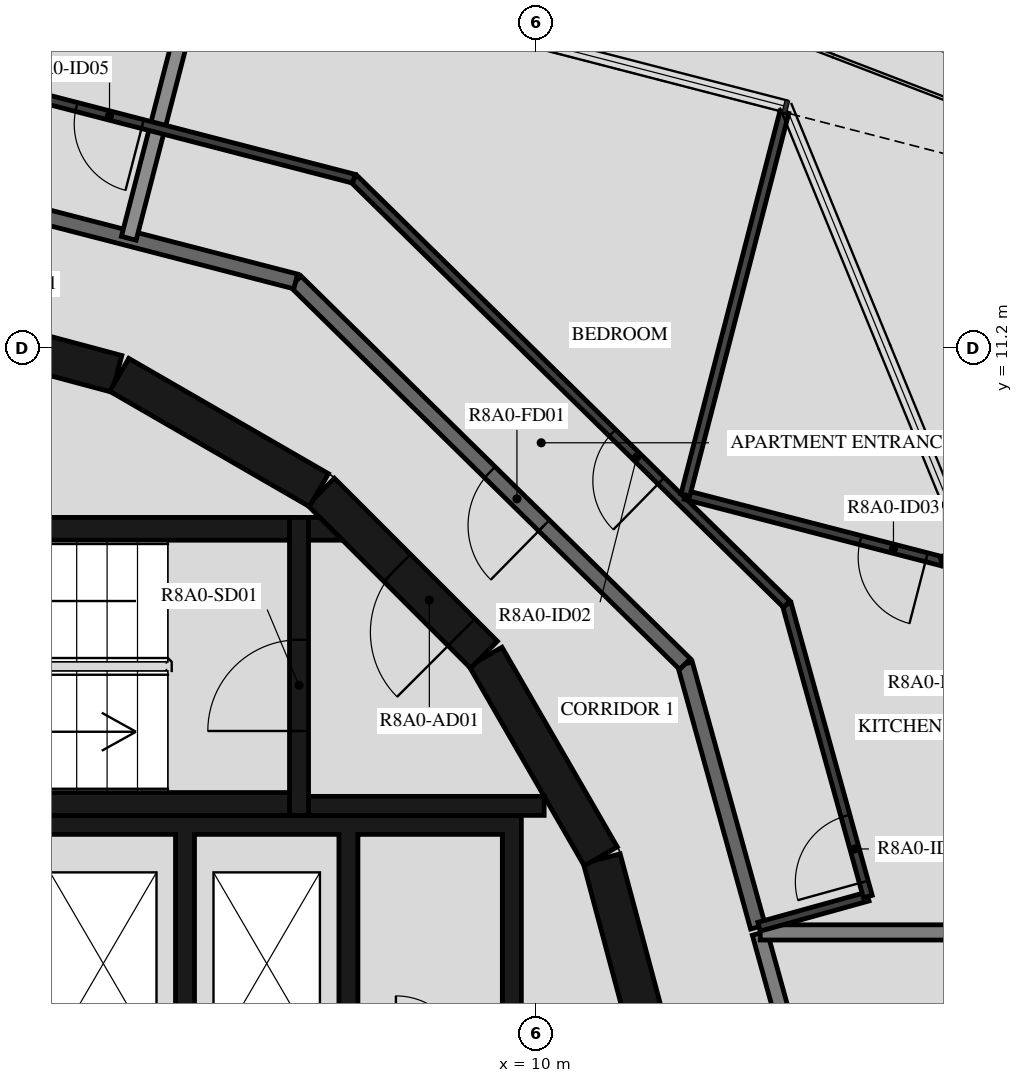
"""IFC4 building model, lengths in metres.
Left out: names, types, materials, properties, quantities, classifications, styles, units other than length and angle.
Written with IfcOpenShell. Run it as: python <this file> out.ifc"""

import sys

from ifc_helpers import new_model, si_unit, direction, frame, frame_2d, origin, place, context, subcontext, project, spatial, polyline, rectangle, outline, extrude, element, fill, save


model = new_model("IFC4")
c1 = context("Model", 3, precision=1e-05, world=origin(), true_north=direction((0.0, 1.0)))
c2 = subcontext(c1, "Body", "Model", "MODEL_VIEW")
j1 = project(units=[si_unit("LENGTHUNIT", "METRE"), si_unit("PLANEANGLEUNIT", "RADIAN")], contexts=[c1])
p1 = place(None, origin())
s1 = spatial("IfcSite", under=j1, at=p1, CompositionType="ELEMENT")
p2 = place(p1, origin())
s2 = spatial("IfcBuilding", under=s1, at=p2, CompositionType="ELEMENT")
p3 = place(p2, frame((0.0, 0.0, 298.2)))
s3 = spatial("IfcBuildingStorey", under=s2, at=p3, CompositionType="ELEMENT", Elevation=298.2)
for number, where, z_axis, x_axis in (
    (1, (11.643, 1.55, 0.0), (0.0, 0.0, 1.0), (-0.259, 0.966, 0.0)),
    (2, (10.845, 4.51, 0.0), (0.0, 0.0, 1.0), (-0.5, 0.866, 0.0)),
):
    element("IfcWall", number, at=place(p3, frame(where, z_axis=z_axis, x_axis=x_axis)), inside=s3, PredefinedType="SHEAR", context=c2, shape_type="SweptSolid", body=[
        extrude(rectangle(XDim=3.033, YDim=0.5, at=frame_2d((1.516, 0.0))), origin(), (0.0, 0.0, 1.0), 3.12),
    ])
p4 = place(p3, frame((9.308, 7.164, 0.0), z_axis=(0.0, 0.0, 1.0), x_axis=(-0.707106781187, 0.707106781187, 0.0)))
e3 = element("IfcWall", 3, at=p4, inside=s3, PredefinedType="SHEAR", context=c2, shape_type="SweptSolid", body=[
    extrude(rectangle(XDim=3.032, YDim=0.5, at=frame_2d((1.516, 0.0))), origin(), (0.0, 0.0, 1.0), 3.12),
])
p5 = place(p4, frame((0.416, 0.0, 0.0)))
e4 = element("IfcOpeningElement", 4, at=p5, cuts=e3, PredefinedType="OPENING", context=c2, shape_type="SweptSolid", body=[
    extrude(rectangle(XDim=1.2, YDim=2.1, at=frame_2d((0.6, 1.05))), frame((0.0, 0.26, 0.0), z_axis=(0.0, -1.0, 0.0), x_axis=(1.0, 0.0, 0.0)), (0.0, 0.0, 1.0), 0.52),
])
p6 = place(p3, frame((7.137, 9.329, 0.0), z_axis=(0.0, 0.0, 1.0), x_axis=(-0.865975092491, 0.500087131594, 0.0)))
e5 = element("IfcWall", 5, at=p6, inside=s3, PredefinedType="SHEAR", context=c2, shape_type="SweptSolid", body=[
    extrude(rectangle(XDim=3.033, YDim=0.5, at=frame_2d((1.516, 0.0))), origin(), (0.0, 0.0, 1.0), 3.12),
])
p7 = place(p3, frame((4.479, 10.858, 0.0), z_axis=(0.0, 0.0, 1.0), x_axis=(-0.965948410781, 0.258734743916, 0.0)))
e6 = element("IfcWall", 6, at=p7, inside=s3, PredefinedType="SHEAR", context=c2, shape_type="SweptSolid", body=[
    extrude(rectangle(XDim=3.033, YDim=0.5, at=frame_2d((1.516, 0.0))), origin(), (0.0, 0.0, 1.0), 3.12),
])
p8 = place(p7, frame((1.066, 0.0, 0.0)))
e7 = element("IfcOpeningElement", 7, at=p8, cuts=e6, PredefinedType="OPENING", context=c2, shape_type="SweptSolid", body=[
    extrude(rectangle(XDim=0.9, YDim=2.1, at=frame_2d((0.45, 1.05))), frame((0.0, 0.26, 0.0), z_axis=(0.0, -1.0, 0.0), x_axis=(1.0, 0.0, 0.0)), (0.0, 0.0, 1.0), 0.52),
])
for number, where, z_axis, x_axis in (
    (8, (0.0, 5.2, 0.0), (0.0, 0.0, 1.0), (1.0, 0.0, 0.0)),
    (9, (0.0, 8.82, 0.0), (0.0, 0.0, 1.0), (1.0, 0.0, 0.0)),
):
    element("IfcWall", number, at=place(p3, frame(where, z_axis=z_axis, x_axis=x_axis)), inside=s3, PredefinedType="SHEAR", context=c2, shape_type="SweptSolid", body=[
        extrude(rectangle(XDim=6.75, YDim=0.3, at=frame_2d((3.375, 0.0))), origin(), (0.0, 0.0, 1.0), 3.12),
    ])
p9 = place(p3, frame((6.875, 5.05, 0.0), z_axis=(0.0, 0.0, 1.0), x_axis=(0.0, 1.0, 0.0)))
e10 = element("IfcWall", 10, at=p9, inside=s3, PredefinedType="SHEAR", context=c2, shape_type="SweptSolid", body=[
    extrude(rectangle(XDim=3.92, YDim=0.25, at=frame_2d((1.96, 0.0))), origin(), (0.0, 0.0, 1.0), 3.12),
])
p10 = place(p9, frame((1.11, 0.0, 0.0)))
e11 = element("IfcOpeningElement", 11, at=p10, cuts=e10, PredefinedType="OPENING", context=c2, shape_type="SweptSolid", body=[
    extrude(rectangle(XDim=1.2, YDim=2.1, at=frame_2d((0.6, 1.05))), frame((0.0, 0.135, 0.0), z_axis=(0.0, -1.0, 0.0), x_axis=(1.0, 0.0, 0.0)), (0.0, 0.0, 1.0), 0.27),
])
p11 = place(p3, frame((7.0, 5.175, 0.0), z_axis=(0.0, 0.0, 1.0), x_axis=(1.0, 0.0, 0.0)))
e12 = element("IfcWall", 12, at=p11, inside=s3, PredefinedType="SHEAR", context=c2, shape_type="SweptSolid", body=[
    extrude(rectangle(XDim=3.1, YDim=0.25, at=frame_2d((1.55, 0.0))), origin(), (0.0, 0.0, 1.0), 3.12),
])
p12 = place(p3, origin())
e13 = element("IfcWall", 13, at=p12, inside=s3, PredefinedType="SHEAR", context=c2, shape_type="SweptSolid", body=[
    extrude(outline(polyline([(7.448, 8.67), (7.0, 8.67), (7.0, 8.97), (7.148, 8.97), (7.448, 8.67)])), origin(), (0.0, 0.0, 1.0), 3.12),
])
p13 = place(p3, origin())
e14 = element("IfcWall", 14, at=p13, inside=s3, PredefinedType="SHEAR", context=c2, shape_type="SweptSolid", body=[
    extrude(outline(polyline([(-9.8, 1.9), (-9.55, 1.9), (-9.55, 4.8), (-1.2, 4.8), (-1.2, 1.9), (-0.95, 1.9), (-0.95, 4.8), (3.1, 4.8), (3.1, 1.9), (3.35, 1.9), (3.35, 4.8), (5.25, 4.8), (5.25, 1.9), (5.5, 1.9), (5.5, 4.8), (7.4, 4.8), (7.4, 1.9), (7.65, 1.9), (7.65, 4.8), (9.55, 4.8), (9.55, 1.9), (9.8, 1.9), (9.8, 4.8), (9.8, 5.05), (-9.8, 5.05), (-9.8, 4.8), (-9.8, 1.9)])), origin(), (0.0, 0.0, 1.0), 3.12),
])
p14 = place(p3, frame((13.872, 0.121, 0.0), z_axis=(0.0, 0.0, 1.0), x_axis=(-0.267291928416, 0.963615600228, 0.0)))
e15 = element("IfcWall", 15, at=p14, inside=s3, PredefinedType="STANDARD", context=c2, shape_type="SweptSolid", body=[
    extrude(rectangle(XDim=3.507, YDim=0.2, at=frame_2d((1.753, 0.0))), origin(), (0.0, 0.0, 1.0), 3.12),
])
p15 = place(p3, frame((12.913, 3.581, 0.0), z_axis=(0.0, 0.0, 1.0), x_axis=(-0.267223005422, 0.963634715737, 0.0)))
e16 = element("IfcWall", 16, at=p15, inside=s3, PredefinedType="STANDARD", context=c2, shape_type="SweptSolid", body=[
    extrude(rectangle(XDim=3.591, YDim=0.2, at=frame_2d((1.795, 0.0))), origin(), (0.0, 0.0, 1.0), 3.12),
])
p16 = place(p3, frame((11.953, 7.041, 0.0), z_axis=(0.0, 0.0, 1.0), x_axis=(-0.713250549143, 0.70090916255, 0.0)))
e17 = element("IfcWall", 17, at=p16, inside=s3, PredefinedType="STANDARD", context=c2, shape_type="SweptSolid", body=[
    extrude(rectangle(XDim=7.181, YDim=0.2, at=frame_2d((3.59, 0.0))), origin(), (0.0, 0.0, 1.0), 3.12),
])
p17 = place(p16, frame((2.6, 0.0, 0.0)))
e18 = element("IfcOpeningElement", 18, at=p17, cuts=e17, PredefinedType="OPENING", context=c2, shape_type="SweptSolid", body=[
    extrude(rectangle(XDim=1.0, YDim=2.1, at=frame_2d((0.5, 1.05))), frame((0.0, 0.11, 0.0), z_axis=(0.0, -1.0, 0.0), x_axis=(1.0, 0.0, 0.0)), (0.0, 0.0, 1.0), 0.22),
])
p18 = place(p3, frame((6.831, 12.074, 0.0), z_axis=(0.0, 0.0, 1.0), x_axis=(-0.968144780225, 0.250391063186, 0.0)))
e19 = element("IfcWall", 19, at=p18, inside=s3, PredefinedType="STANDARD", context=c2, shape_type="SweptSolid", body=[
    extrude(rectangle(XDim=7.181, YDim=0.2, at=frame_2d((3.591, 0.0))), origin(), (0.0, 0.0, 1.0), 3.12),
])
p19 = place(p3, frame((16.203, 3.51, 0.0), z_axis=(0.0, 0.0, 1.0), x_axis=(-1.0, 0.0, 0.0)))
e20 = element("IfcWall", 20, at=p19, inside=s3, PredefinedType="STANDARD", context=c2, shape_type="SweptSolid", body=[
    extrude(rectangle(XDim=3.26, YDim=0.2, at=frame_2d((1.63, 0.0))), origin(), (0.0, 0.0, 1.0), 3.12),
])
p20 = place(p3, frame((5.578, 16.287, 0.0), z_axis=(0.0, 0.0, 1.0), x_axis=(-0.250385965992, -0.968146098497, 0.0)))
e21 = element("IfcWall", 21, at=p20, inside=s3, PredefinedType="STANDARD", context=c2, shape_type="SweptSolid", body=[
    extrude(rectangle(XDim=3.765, YDim=0.2, at=frame_2d((1.882, 0.0))), origin(), (0.0, 0.0, 1.0), 2.73),
])
p21 = place(p3, frame((12.927, 3.585, 0.0), z_axis=(0.0, 0.0, 1.0), x_axis=(0.963616756608, 0.26728775951, 0.0)))
e22 = element("IfcWall", 22, at=p21, inside=s3, PredefinedType="PARTITIONING", context=c2, shape_type="SweptSolid", body=[
    extrude(rectangle(XDim=1.485, YDim=0.12, at=frame_2d((0.743, 0.0))), origin(), (0.0, 0.0, 1.0), 3.12),
])
p22 = place(p3, frame((14.358, 3.982, 0.0), z_axis=(0.0, 0.0, 1.0), x_axis=(-0.267233823916, 0.963631715623, 0.0)))
e23 = element("IfcWall", 23, at=p22, inside=s3, PredefinedType="PARTITIONING", context=c2, shape_type="SweptSolid", body=[
    extrude(rectangle(XDim=3.992, YDim=0.12, at=frame_2d((1.996, 0.0))), origin(), (0.0, 0.0, 1.0), 3.12),
])
p23 = place(p22, frame((0.2, 0.0, 0.0)))
e24 = element("IfcOpeningElement", 24, at=p23, cuts=e23, PredefinedType="OPENING", context=c2, shape_type="SweptSolid", body=[
    extrude(rectangle(XDim=0.9, YDim=2.1, at=frame_2d((0.45, 1.05))), frame((0.0, 0.07, 0.0), z_axis=(0.0, -1.0, 0.0), x_axis=(1.0, 0.0, 0.0)), (0.0, 0.0, 1.0), 0.14),
])
p24 = place(p3, frame((13.291, 7.829, 0.0), z_axis=(0.0, 0.0, 1.0), x_axis=(-0.713255978622, 0.700903637428, 0.0)))
e25 = element("IfcWall", 25, at=p24, inside=s3, PredefinedType="PARTITIONING", context=c2, shape_type="SweptSolid", body=[
    extrude(rectangle(XDim=7.985, YDim=0.12, at=frame_2d((3.992, 0.0))), origin(), (0.0, 0.0, 1.0), 3.12),
])
p25 = place(p24, frame((2.314, 0.0, 0.0)))
e26 = element("IfcOpeningElement", 26, at=p25, cuts=e25, PredefinedType="OPENING", context=c2, shape_type="SweptSolid", body=[
    extrude(rectangle(XDim=0.9, YDim=2.1, at=frame_2d((0.45, 1.05))), frame((0.0, 0.07, 0.0), z_axis=(0.0, -1.0, 0.0), x_axis=(1.0, 0.0, 0.0)), (0.0, 0.0, 1.0), 0.14),
])
p26 = place(p3, frame((7.596, 13.426, 0.0), z_axis=(0.0, 0.0, 1.0), x_axis=(-0.968146656033, 0.250383810203, 0.0)))
e27 = element("IfcWall", 27, at=p26, inside=s3, PredefinedType="PARTITIONING", context=c2, shape_type="SweptSolid", body=[
    extrude(rectangle(XDim=7.985, YDim=0.12, at=frame_2d((3.992, 0.0))), origin(), (0.0, 0.0, 1.0), 3.12),
])
p27 = place(p26, frame((2.87, 0.0, 0.0)))
e28 = element("IfcOpeningElement", 28, at=p27, cuts=e27, PredefinedType="OPENING", context=c2, shape_type="SweptSolid", body=[
    extrude(rectangle(XDim=0.9, YDim=2.1, at=frame_2d((0.45, 1.05))), frame((0.0, 0.07, 0.0), z_axis=(0.0, -1.0, 0.0), x_axis=(1.0, 0.0, 0.0)), (0.0, 0.0, 1.0), 0.14),
])
p28 = place(p3, frame((18.071, 7.685, 0.0), z_axis=(0.0, 0.0, 1.0), x_axis=(-0.968152245082, 0.250362198309, 0.0)))
e29 = element("IfcWall", 29, at=p28, inside=s3, PredefinedType="PARTITIONING", context=c2, shape_type="SweptSolid", body=[
    extrude(rectangle(XDim=6.313, YDim=0.12, at=frame_2d((3.157, 0.0))), origin(), (0.0, 0.0, 1.0), 3.12),
])
p29 = place(p28, frame((3.036, 0.0, 0.0)))
e30 = element("IfcOpeningElement", 30, at=p29, cuts=e29, PredefinedType="OPENING", context=c2, shape_type="SweptSolid", body=[
    extrude(rectangle(XDim=0.9, YDim=2.1, at=frame_2d((0.45, 1.05))), frame((0.0, 0.07, 0.0), z_axis=(0.0, -1.0, 0.0), x_axis=(1.0, 0.0, 0.0)), (0.0, 0.0, 1.0), 0.14),
])
p30 = place(p3, frame((23.225, 10.593, 0.0), z_axis=(0.0, 0.0, 1.0), x_axis=(-0.963409492722, -0.268033858559, 0.0)))
e31 = element("IfcWall", 31, at=p30, inside=s3, PredefinedType="PARTITIONING", context=c2, shape_type="SweptSolid", body=[
    extrude(rectangle(XDim=8.2, YDim=0.12, at=frame_2d((4.1, 0.0))), origin(), (0.0, 0.0, 1.0), 3.12),
])
p31 = place(p30, frame((0.5, 0.0, 0.0)))
e32 = element("IfcOpeningElement", 32, at=p31, cuts=e31, PredefinedType="OPENING", context=c2, shape_type="SweptSolid", body=[
    extrude(rectangle(XDim=0.9, YDim=2.1, at=frame_2d((0.45, 1.05))), frame((0.0, 0.07, 0.0), z_axis=(0.0, -1.0, 0.0), x_axis=(1.0, 0.0, 0.0)), (0.0, 0.0, 1.0), 0.14),
])
p32 = place(p3, frame((13.26, 14.3, 0.0), z_axis=(0.0, 0.0, 1.0), x_axis=(-0.25038206324, -0.968147107834, 0.0)))
e33 = element("IfcWall", 33, at=p32, inside=s3, PredefinedType="PARTITIONING", context=c2, shape_type="SweptSolid", body=[
    extrude(rectangle(XDim=5.2, YDim=0.12, at=frame_2d((2.6, 0.0))), origin(), (0.0, 0.0, 1.0), 2.73),
])
p33 = place(p10, origin())
e34 = element("IfcDoor", 34, at=p33, inside=s3, OperationType="SINGLE_SWING_LEFT", PredefinedType="DOOR", context=c2, shape_type="SweptSolid", body=[
    extrude(rectangle(XDim=1.2, YDim=2.1, at=frame_2d((0.6, 1.05))), frame((0.0, 0.025, 0.0), z_axis=(0.0, -1.0, 0.0), x_axis=(1.0, 0.0, 0.0)), (0.0, 0.0, 1.0), 0.05),
])
fill(e11, e34)
p34 = place(p5, origin())
e35 = element("IfcDoor", 35, at=p34, inside=s3, OperationType="SINGLE_SWING_RIGHT", PredefinedType="DOOR", context=c2, shape_type="SweptSolid", body=[
    extrude(rectangle(XDim=1.2, YDim=2.1, at=frame_2d((0.6, 1.05))), frame((0.0, 0.025, 0.0), z_axis=(0.0, -1.0, 0.0), x_axis=(1.0, 0.0, 0.0)), (0.0, 0.0, 1.0), 0.05),
])
fill(e4, e35)
p35 = place(p17, origin())
e36 = element("IfcDoor", 36, at=p35, inside=s3, OperationType="SINGLE_SWING_LEFT", PredefinedType="DOOR", context=c2, shape_type="SweptSolid", body=[
    extrude(rectangle(XDim=1.0, YDim=2.1, at=frame_2d((0.5, 1.05))), frame((0.0, 0.025, 0.0), z_axis=(0.0, -1.0, 0.0), x_axis=(1.0, 0.0, 0.0)), (0.0, 0.0, 1.0), 0.05),
])
fill(e18, e36)
p36 = place(p23, origin())
e37 = element("IfcDoor", 37, at=p36, inside=s3, OperationType="SINGLE_SWING_LEFT", PredefinedType="DOOR", context=c2, shape_type="SweptSolid", body=[
    extrude(rectangle(XDim=0.9, YDim=2.1, at=frame_2d((0.45, 1.05))), frame((0.0, 0.025, 0.0), z_axis=(0.0, -1.0, 0.0), x_axis=(1.0, 0.0, 0.0)), (0.0, 0.0, 1.0), 0.05),
])
fill(e24, e37)
p37 = place(p25, origin())
e38 = element("IfcDoor", 38, at=p37, inside=s3, OperationType="SINGLE_SWING_LEFT", PredefinedType="DOOR", context=c2, shape_type="SweptSolid", body=[
    extrude(rectangle(XDim=0.9, YDim=2.1, at=frame_2d((0.45, 1.05))), frame((0.0, 0.025, 0.0), z_axis=(0.0, -1.0, 0.0), x_axis=(1.0, 0.0, 0.0)), (0.0, 0.0, 1.0), 0.05),
])
fill(e26, e38)
p38 = place(p29, origin())
e39 = element("IfcDoor", 39, at=p38, inside=s3, OperationType="SINGLE_SWING_LEFT", PredefinedType="DOOR", context=c2, shape_type="SweptSolid", body=[
    extrude(rectangle(XDim=0.9, YDim=2.1, at=frame_2d((0.45, 1.05))), frame((0.0, 0.025, 0.0), z_axis=(0.0, -1.0, 0.0), x_axis=(1.0, 0.0, 0.0)), (0.0, 0.0, 1.0), 0.05),
])
fill(e30, e39)
p39 = place(p27, origin())
e40 = element("IfcDoor", 40, at=p39, inside=s3, OperationType="SINGLE_SWING_LEFT", PredefinedType="DOOR", context=c2, shape_type="SweptSolid", body=[
    extrude(rectangle(XDim=0.9, YDim=2.1, at=frame_2d((0.45, 1.05))), frame((0.0, 0.025, 0.0), z_axis=(0.0, -1.0, 0.0), x_axis=(1.0, 0.0, 0.0)), (0.0, 0.0, 1.0), 0.05),
])
fill(e28, e40)
save(model, sys.argv[1])
